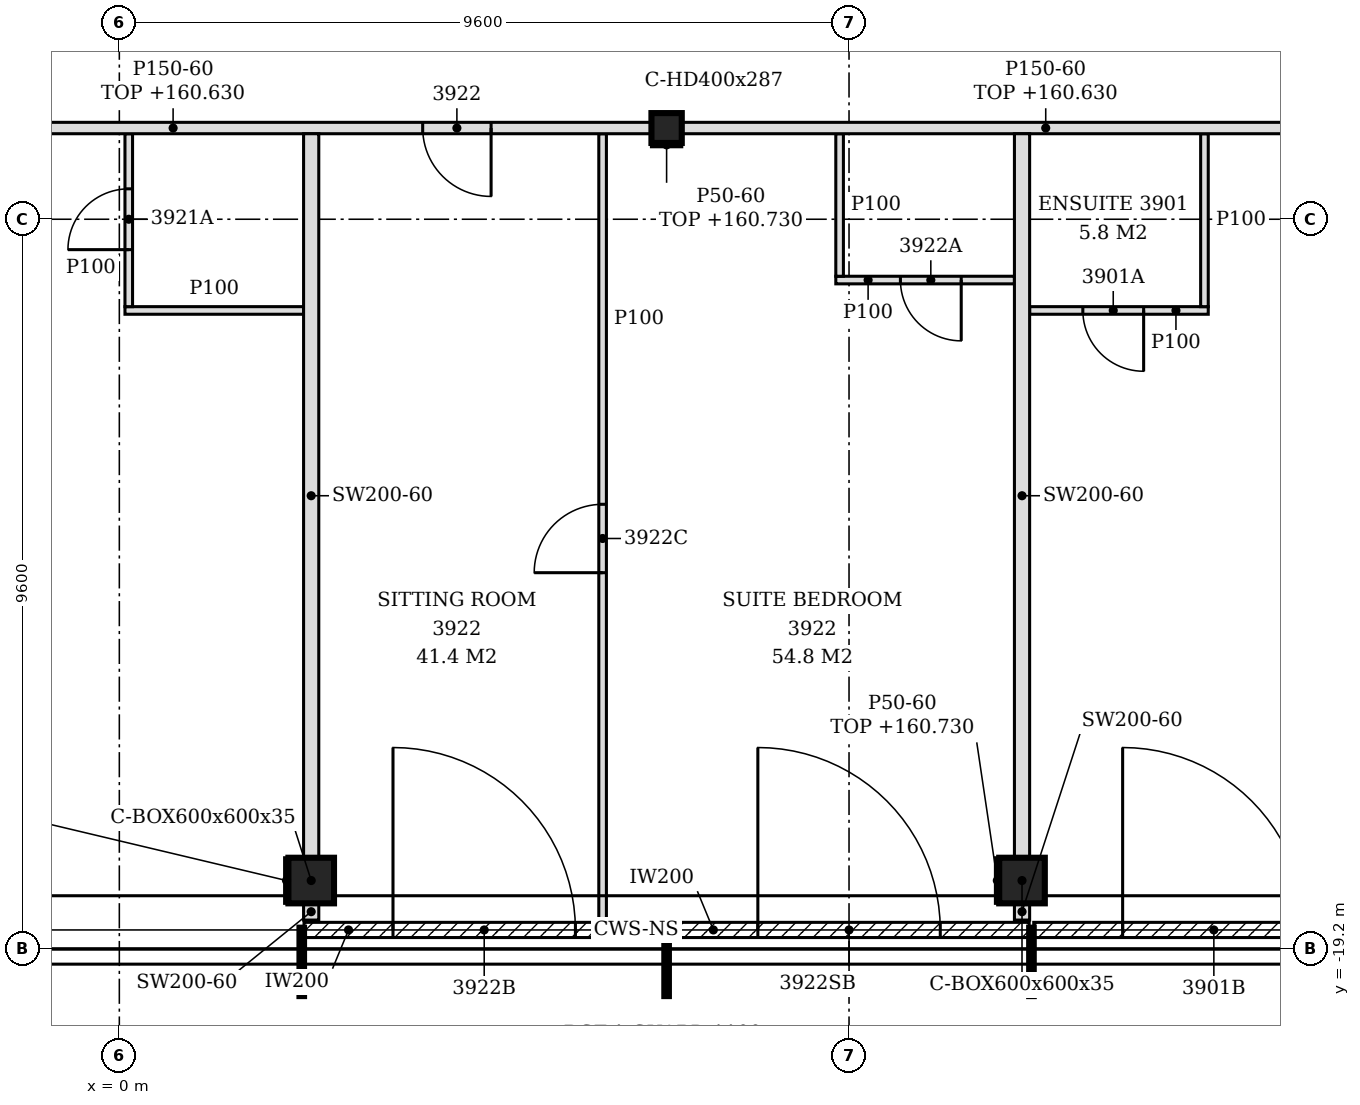
"""IFC4 building model, lengths in metres.
Left out: names, types, materials, properties, quantities, classifications, styles, units other than length and angle.
Written with IfcOpenShell. Run it as: python <this file> out.ifc"""

import sys

from ifc_helpers import new_model, si_unit, direction, frame, frame_2d, origin, origin_2d, place, context, subcontext, project, spatial, polyline, rectangle, hollow_rectangle, i_section, outline, extrude, element, fill, save


model = new_model("IFC4")
c1 = context("Model", 3, precision=1e-05, world=origin(), true_north=direction((0.0, 1.0)))
c2 = subcontext(c1, "Body", "Model", "MODEL_VIEW")
j1 = project(units=[si_unit("LENGTHUNIT", "METRE"), si_unit("PLANEANGLEUNIT", "RADIAN")], contexts=[c1])
p1 = place(None, origin())
s1 = spatial("IfcSite", under=j1, at=p1, CompositionType="ELEMENT")
p2 = place(p1, origin())
s2 = spatial("IfcBuilding", under=s1, at=p2, CompositionType="ELEMENT")
p3 = place(p2, frame((0.0, 0.0, 157.8)))
s3 = spatial("IfcBuildingStorey", under=s2, at=p3, CompositionType="ELEMENT", Elevation=157.8)
for number, where, z_axis, x_axis in (
    (1, (2.524, -18.3, -0.15), (0.0, 0.0, 1.0), (1.0, 0.0, 0.0)),
    (2, (11.876, -18.3, -0.15), (0.0, 0.0, 1.0), (1.0, 0.0, 0.0)),
):
    element("IfcColumn", number, at=place(p3, frame(where, z_axis=z_axis, x_axis=x_axis)), inside=s3, PredefinedType="COLUMN", context=c2, shape_type="SweptSolid", body=[
        extrude(hollow_rectangle(XDim=0.6, YDim=0.6, WallThickness=0.035, at=origin_2d()), origin(), (0.0, 0.0, 1.0), 3.6),
    ])
p4 = place(p3, frame((7.2, -8.4, -0.15), z_axis=(0.0, 0.0, 1.0), x_axis=(1.0, 0.0, 0.0)))
e3 = element("IfcColumn", 3, at=p4, inside=s3, PredefinedType="COLUMN", context=c2, shape_type="SweptSolid", body=[
    extrude(i_section(OverallWidth=0.399, OverallDepth=0.393, WebThickness=0.023, FlangeThickness=0.037, FilletRadius=0.015, at=origin_2d()), origin(), (0.0, 0.0, 1.0), 3.6),
])
p5 = place(p3, frame((2.43, -18.95, 0.0), z_axis=(0.0, 0.0, 1.0), x_axis=(1.0, 0.0, 0.0)))
e4 = element("IfcWall", 4, at=p5, inside=s3, PredefinedType="NOTDEFINED", context=c2, shape_type="SweptSolid", body=[
    extrude(rectangle(XDim=4.74, YDim=0.2, at=frame_2d((2.37, 0.0))), origin(), (0.0, 0.0, 1.0), 3.45),
])
p6 = place(p5, frame((1.17, 0.0, 0.0)))
e5 = element("IfcOpeningElement", 5, at=p6, cuts=e4, PredefinedType="OPENING", context=c2, shape_type="SweptSolid", body=[
    extrude(rectangle(XDim=2.4, YDim=2.4, at=frame_2d((1.2, 1.2))), frame((0.0, 0.11, 0.0), z_axis=(0.0, -1.0, 0.0), x_axis=(1.0, 0.0, 0.0)), (0.0, 0.0, 1.0), 0.22),
])
p7 = place(p3, frame((7.23, -18.95, 0.0), z_axis=(0.0, 0.0, 1.0), x_axis=(1.0, 0.0, 0.0)))
e6 = element("IfcWall", 6, at=p7, inside=s3, PredefinedType="NOTDEFINED", context=c2, shape_type="SweptSolid", body=[
    extrude(rectangle(XDim=4.74, YDim=0.2, at=frame_2d((2.37, 0.0))), origin(), (0.0, 0.0, 1.0), 3.45),
])
p8 = place(p7, frame((1.17, 0.0, 0.0)))
e7 = element("IfcOpeningElement", 7, at=p8, cuts=e6, PredefinedType="OPENING", context=c2, shape_type="SweptSolid", body=[
    extrude(rectangle(XDim=2.4, YDim=2.4, at=frame_2d((1.2, 1.2))), frame((0.0, 0.11, 0.0), z_axis=(0.0, -1.0, 0.0), x_axis=(1.0, 0.0, 0.0)), (0.0, 0.0, 1.0), 0.22),
])
p9 = place(p3, frame((12.03, -18.95, 0.0), z_axis=(0.0, 0.0, 1.0), x_axis=(1.0, 0.0, 0.0)))
e8 = element("IfcWall", 8, at=p9, inside=s3, PredefinedType="NOTDEFINED", context=c2, shape_type="SweptSolid", body=[
    extrude(rectangle(XDim=4.74, YDim=0.2, at=frame_2d((2.37, 0.0))), origin(), (0.0, 0.0, 1.0), 3.45),
])
p10 = place(p9, frame((1.17, 0.0, 0.0)))
e9 = element("IfcOpeningElement", 9, at=p10, cuts=e8, PredefinedType="OPENING", context=c2, shape_type="SweptSolid", body=[
    extrude(rectangle(XDim=2.4, YDim=2.4, at=frame_2d((1.2, 1.2))), frame((0.0, 0.11, 0.0), z_axis=(0.0, -1.0, 0.0), x_axis=(1.0, 0.0, 0.0)), (0.0, 0.0, 1.0), 0.22),
])
p11 = place(p3, frame((2.524, -18.82, 0.0), z_axis=(0.0, 0.0, 1.0), x_axis=(0.0, 1.0, 0.0)))
e10 = element("IfcWall", 10, at=p11, inside=s3, PredefinedType="PARTITIONING", context=c2, shape_type="SweptSolid", body=[
    extrude(rectangle(XDim=0.22, YDim=0.2, at=frame_2d((0.11, 0.0))), origin(), (0.0, 0.0, 1.0), 3.45),
])
p12 = place(p3, frame((6.358, -18.82, 0.0), z_axis=(0.0, 0.0, 1.0), x_axis=(0.0, 1.0, 0.0)))
e11 = element("IfcWall", 11, at=p12, inside=s3, PredefinedType="PARTITIONING", context=c2, shape_type="SweptSolid", body=[
    extrude(outline(polyline([(0.0, 0.0), (10.345, 0.0), (10.345, 2.83), (10.27, 2.83), (10.268, 3.45), (4.525, 3.45), (4.523, 2.88), (4.315, 2.88), (4.313, 3.45), (0.67, 3.45), (0.668, 2.93), (0.37, 2.93), (0.368, 3.45), (0.0, 3.45), (0.0, 0.0)])), frame((0.0, 0.05, 0.0), z_axis=(0.0, -1.0, 0.0), x_axis=(1.0, 0.0, 0.0)), (0.0, 0.0, 1.0), 0.1),
])
p13 = place(p12, frame((4.57, 0.0, 0.0)))
e12 = element("IfcOpeningElement", 12, at=p13, cuts=e11, PredefinedType="OPENING", context=c2, shape_type="SweptSolid", body=[
    extrude(rectangle(XDim=0.9, YDim=2.1, at=frame_2d((0.45, 1.05))), frame((0.0, 0.06, 0.0), z_axis=(0.0, -1.0, 0.0), x_axis=(1.0, 0.0, 0.0)), (0.0, 0.0, 1.0), 0.12),
])
p14 = place(p3, frame((11.876, -18.82, 0.0), z_axis=(0.0, 0.0, 1.0), x_axis=(0.0, 1.0, 0.0)))
e13 = element("IfcWall", 13, at=p14, inside=s3, PredefinedType="PARTITIONING", context=c2, shape_type="SweptSolid", body=[
    extrude(rectangle(XDim=0.22, YDim=0.2, at=frame_2d((0.11, 0.0))), origin(), (0.0, 0.0, 1.0), 3.45),
])
for number, where, z_axis, x_axis in (
    (14, (2.524, -18.0, 0.0), (0.0, 0.0, 1.0), (0.0, 1.0, 0.0)),
    (15, (11.876, -18.0, 0.0), (0.0, 0.0, 1.0), (0.0, 1.0, 0.0)),
):
    element("IfcWall", number, at=place(p3, frame(where, z_axis=z_axis, x_axis=x_axis)), inside=s3, PredefinedType="PARTITIONING", context=c2, shape_type="SweptSolid", body=[
        extrude(outline(polyline([(0.0, 0.0), (9.525, 0.0), (9.525, 2.83), (9.45, 2.83), (9.448, 3.45), (3.705, 3.45), (3.703, 2.88), (3.495, 2.88), (3.493, 3.45), (0.0, 3.45), (0.0, 0.0)])), frame((0.0, 0.1, 0.0), z_axis=(0.0, -1.0, 0.0), x_axis=(1.0, 0.0, 0.0)), (0.0, 0.0, 1.0), 0.2),
    ])
p15 = place(p3, frame((0.074, -10.8, 0.0), z_axis=(0.0, 0.0, 1.0), x_axis=(1.0, 0.0, 0.0)))
e16 = element("IfcWall", 16, at=p15, inside=s3, PredefinedType="PARTITIONING", context=c2, shape_type="SweptSolid", body=[
    extrude(rectangle(XDim=2.35, YDim=0.1, at=frame_2d((1.175, 0.0))), origin(), (0.0, 0.0, 1.0), 3.45),
])
p16 = place(p3, frame((0.124, -10.75, 0.0), z_axis=(0.0, 0.0, 1.0), x_axis=(0.0, 1.0, 0.0)))
e17 = element("IfcWall", 17, at=p16, inside=s3, PredefinedType="PARTITIONING", context=c2, shape_type="SweptSolid", body=[
    extrude(outline(polyline([(0.0, 0.0), (2.275, 0.0), (2.275, 2.83), (2.2, 2.83), (2.198, 3.45), (0.0, 3.45), (0.0, 0.0)])), frame((0.0, 0.05, 0.0), z_axis=(0.0, -1.0, 0.0), x_axis=(1.0, 0.0, 0.0)), (0.0, 0.0, 1.0), 0.1),
])
p17 = place(p16, frame((0.75, 0.0, 0.0)))
e18 = element("IfcOpeningElement", 18, at=p17, cuts=e17, PredefinedType="OPENING", context=c2, shape_type="SweptSolid", body=[
    extrude(rectangle(XDim=0.8, YDim=2.1, at=frame_2d((0.4, 1.05))), frame((0.0, 0.06, 0.0), z_axis=(0.0, -1.0, 0.0), x_axis=(1.0, 0.0, 0.0)), (0.0, 0.0, 1.0), 0.12),
])
p18 = place(p3, frame((11.976, -10.8, 0.0), z_axis=(0.0, 0.0, 1.0), x_axis=(1.0, 0.0, 0.0)))
e19 = element("IfcWall", 19, at=p18, inside=s3, PredefinedType="PARTITIONING", context=c2, shape_type="SweptSolid", body=[
    extrude(rectangle(XDim=2.35, YDim=0.1, at=frame_2d((1.175, 0.0))), origin(), (0.0, 0.0, 1.0), 3.45),
])
p19 = place(p18, frame((0.7, 0.0, 0.0)))
e20 = element("IfcOpeningElement", 20, at=p19, cuts=e19, PredefinedType="OPENING", context=c2, shape_type="SweptSolid", body=[
    extrude(rectangle(XDim=0.8, YDim=2.1, at=frame_2d((0.4, 1.05))), frame((0.0, 0.06, 0.0), z_axis=(0.0, -1.0, 0.0), x_axis=(1.0, 0.0, 0.0)), (0.0, 0.0, 1.0), 0.12),
])
p20 = place(p3, frame((14.276, -10.75, 0.0), z_axis=(0.0, 0.0, 1.0), x_axis=(0.0, 1.0, 0.0)))
e21 = element("IfcWall", 21, at=p20, inside=s3, PredefinedType="PARTITIONING", context=c2, shape_type="SweptSolid", body=[
    extrude(outline(polyline([(0.0, 0.0), (2.275, 0.0), (2.275, 2.83), (2.2, 2.83), (2.198, 3.45), (0.0, 3.45), (0.0, 0.0)])), frame((0.0, 0.05, 0.0), z_axis=(0.0, -1.0, 0.0), x_axis=(1.0, 0.0, 0.0)), (0.0, 0.0, 1.0), 0.1),
])
p21 = place(p3, frame((9.426, -10.4, 0.0), z_axis=(0.0, 0.0, 1.0), x_axis=(1.0, 0.0, 0.0)))
e22 = element("IfcWall", 22, at=p21, inside=s3, PredefinedType="PARTITIONING", context=c2, shape_type="SweptSolid", body=[
    extrude(rectangle(XDim=2.35, YDim=0.1, at=frame_2d((1.175, 0.0))), origin(), (0.0, 0.0, 1.0), 3.45),
])
p22 = place(p21, frame((0.85, 0.0, 0.0)))
e23 = element("IfcOpeningElement", 23, at=p22, cuts=e22, PredefinedType="OPENING", context=c2, shape_type="SweptSolid", body=[
    extrude(rectangle(XDim=0.8, YDim=2.1, at=frame_2d((0.4, 1.05))), frame((0.0, 0.06, 0.0), z_axis=(0.0, -1.0, 0.0), x_axis=(1.0, 0.0, 0.0)), (0.0, 0.0, 1.0), 0.12),
])
p23 = place(p3, frame((9.476, -10.35, 0.0), z_axis=(0.0, 0.0, 1.0), x_axis=(0.0, 1.0, 0.0)))
e24 = element("IfcWall", 24, at=p23, inside=s3, PredefinedType="PARTITIONING", context=c2, shape_type="SweptSolid", body=[
    extrude(outline(polyline([(0.0, 0.0), (1.875, 0.0), (1.875, 2.83), (1.8, 2.83), (1.798, 3.45), (0.0, 3.45), (0.0, 0.0)])), frame((0.0, 0.05, 0.0), z_axis=(0.0, -1.0, 0.0), x_axis=(1.0, 0.0, 0.0)), (0.0, 0.0, 1.0), 0.1),
])
p24 = place(p3, frame((-4.601, -8.4, 0.0), z_axis=(0.0, 0.0, 1.0), x_axis=(1.0, 0.0, 0.0)))
e25 = element("IfcWall", 25, at=p24, inside=s3, PredefinedType="PARTITIONING", context=c2, shape_type="SweptSolid", body=[
    extrude(rectangle(XDim=11.601, YDim=0.15, at=frame_2d((5.801, 0.0))), origin(), (0.0, 0.0, 1.0), 2.83),
])
p25 = place(p24, frame((1.125, 0.0, 0.0)))
e26 = element("IfcOpeningElement", 26, at=p25, cuts=e25, PredefinedType="OPENING", context=c2, shape_type="SweptSolid", body=[
    extrude(rectangle(XDim=0.9, YDim=2.1, at=frame_2d((0.45, 1.05))), frame((0.0, 0.085, 0.0), z_axis=(0.0, -1.0, 0.0), x_axis=(1.0, 0.0, 0.0)), (0.0, 0.0, 1.0), 0.17),
])
p26 = place(p24, frame((8.592, 0.0, 0.0)))
e27 = element("IfcOpeningElement", 27, at=p26, cuts=e25, PredefinedType="OPENING", context=c2, shape_type="SweptSolid", body=[
    extrude(rectangle(XDim=0.9, YDim=2.1, at=frame_2d((0.45, 1.05))), frame((0.0, 0.085, 0.0), z_axis=(0.0, -1.0, 0.0), x_axis=(1.0, 0.0, 0.0)), (0.0, 0.0, 1.0), 0.17),
])
p27 = place(p3, frame((7.399, -8.4, 0.0), z_axis=(0.0, 0.0, 1.0), x_axis=(1.0, 0.0, 0.0)))
e28 = element("IfcWall", 28, at=p27, inside=s3, PredefinedType="PARTITIONING", context=c2, shape_type="SweptSolid", body=[
    extrude(rectangle(XDim=11.601, YDim=0.15, at=frame_2d((5.801, 0.0))), origin(), (0.0, 0.0, 1.0), 2.83),
])
p28 = place(p27, frame((9.576, 0.0, 0.0)))
e29 = element("IfcOpeningElement", 29, at=p28, cuts=e28, PredefinedType="OPENING", context=c2, shape_type="SweptSolid", body=[
    extrude(rectangle(XDim=0.9, YDim=2.1, at=frame_2d((0.45, 1.05))), frame((0.0, 0.085, 0.0), z_axis=(0.0, -1.0, 0.0), x_axis=(1.0, 0.0, 0.0)), (0.0, 0.0, 1.0), 0.17),
])
for number, where, z_axis, x_axis in (
    (30, (2.199, -18.6, 0.0), (0.0, 0.0, 1.0), (0.0, 1.0, 0.0)),
    (31, (11.551, -18.6, 0.0), (0.0, 0.0, 1.0), (0.0, 1.0, 0.0)),
):
    element("IfcWall", number, at=place(p3, frame(where, z_axis=z_axis, x_axis=x_axis)), inside=s3, PredefinedType="PARTITIONING", context=c2, shape_type="SweptSolid", body=[
        extrude(rectangle(XDim=0.6, YDim=0.05, at=frame_2d((0.3, 0.0))), origin(), (0.0, 0.0, 1.0), 2.93),
    ])
p29 = place(p3, frame((7.0, -8.622, 0.0), z_axis=(0.0, 0.0, 1.0), x_axis=(1.0, 0.0, 0.0)))
e32 = element("IfcWall", 32, at=p29, inside=s3, PredefinedType="PARTITIONING", context=c2, shape_type="SweptSolid", body=[
    extrude(rectangle(XDim=0.399, YDim=0.05, at=frame_2d((0.199, 0.0))), origin(), (0.0, 0.0, 1.0), 2.93),
])
p30 = place(p6, origin())
e33 = element("IfcDoor", 33, at=p30, inside=s3, OperationType="SINGLE_SWING_LEFT", PredefinedType="DOOR", context=c2, shape_type="SweptSolid", body=[
    extrude(rectangle(XDim=2.4, YDim=2.4, at=frame_2d((1.2, 1.2))), frame((0.0, 0.025, 0.0), z_axis=(0.0, -1.0, 0.0), x_axis=(1.0, 0.0, 0.0)), (0.0, 0.0, 1.0), 0.05),
])
fill(e5, e33)
p31 = place(p8, origin())
e34 = element("IfcDoor", 34, at=p31, inside=s3, OperationType="SINGLE_SWING_LEFT", PredefinedType="DOOR", context=c2, shape_type="SweptSolid", body=[
    extrude(rectangle(XDim=2.4, YDim=2.4, at=frame_2d((1.2, 1.2))), frame((0.0, 0.025, 0.0), z_axis=(0.0, -1.0, 0.0), x_axis=(1.0, 0.0, 0.0)), (0.0, 0.0, 1.0), 0.05),
])
fill(e7, e34)
p32 = place(p10, origin())
e35 = element("IfcDoor", 35, at=p32, inside=s3, OperationType="SINGLE_SWING_LEFT", PredefinedType="DOOR", context=c2, shape_type="SweptSolid", body=[
    extrude(rectangle(XDim=2.4, YDim=2.4, at=frame_2d((1.2, 1.2))), frame((0.0, 0.025, 0.0), z_axis=(0.0, -1.0, 0.0), x_axis=(1.0, 0.0, 0.0)), (0.0, 0.0, 1.0), 0.05),
])
fill(e9, e35)
p33 = place(p19, frame((0.8, 0.0, 0.0), z_axis=(0.0, 0.0, 1.0), x_axis=(-1.0, 0.0, 0.0)))
e36 = element("IfcDoor", 36, at=p33, inside=s3, OperationType="SINGLE_SWING_LEFT", PredefinedType="DOOR", context=c2, shape_type="SweptSolid", body=[
    extrude(rectangle(XDim=0.8, YDim=2.1, at=frame_2d((0.4, 1.05))), frame((0.0, 0.025, 0.0), z_axis=(0.0, -1.0, 0.0), x_axis=(1.0, 0.0, 0.0)), (0.0, 0.0, 1.0), 0.05),
])
fill(e20, e36)
p34 = place(p17, origin())
e37 = element("IfcDoor", 37, at=p34, inside=s3, OperationType="SINGLE_SWING_LEFT", PredefinedType="DOOR", context=c2, shape_type="SweptSolid", body=[
    extrude(rectangle(XDim=0.8, YDim=2.1, at=frame_2d((0.4, 1.05))), frame((0.0, 0.025, 0.0), z_axis=(0.0, -1.0, 0.0), x_axis=(1.0, 0.0, 0.0)), (0.0, 0.0, 1.0), 0.05),
])
fill(e18, e37)
p35 = place(p26, frame((0.9, 0.0, 0.0), z_axis=(0.0, 0.0, 1.0), x_axis=(-1.0, 0.0, 0.0)))
e38 = element("IfcDoor", 38, at=p35, inside=s3, OperationType="SINGLE_SWING_LEFT", PredefinedType="DOOR", context=c2, shape_type="SweptSolid", body=[
    extrude(rectangle(XDim=0.9, YDim=2.1, at=frame_2d((0.45, 1.05))), frame((0.0, 0.025, 0.0), z_axis=(0.0, -1.0, 0.0), x_axis=(1.0, 0.0, 0.0)), (0.0, 0.0, 1.0), 0.05),
])
fill(e27, e38)
p36 = place(p13, origin())
e39 = element("IfcDoor", 39, at=p36, inside=s3, OperationType="SINGLE_SWING_LEFT", PredefinedType="DOOR", context=c2, shape_type="SweptSolid", body=[
    extrude(rectangle(XDim=0.9, YDim=2.1, at=frame_2d((0.45, 1.05))), frame((0.0, 0.025, 0.0), z_axis=(0.0, -1.0, 0.0), x_axis=(1.0, 0.0, 0.0)), (0.0, 0.0, 1.0), 0.05),
])
fill(e12, e39)
p37 = place(p22, frame((0.8, 0.0, 0.0), z_axis=(0.0, 0.0, 1.0), x_axis=(-1.0, 0.0, 0.0)))
e40 = element("IfcDoor", 40, at=p37, inside=s3, OperationType="SINGLE_SWING_LEFT", PredefinedType="DOOR", context=c2, shape_type="SweptSolid", body=[
    extrude(rectangle(XDim=0.8, YDim=2.1, at=frame_2d((0.4, 1.05))), frame((0.0, 0.025, 0.0), z_axis=(0.0, -1.0, 0.0), x_axis=(1.0, 0.0, 0.0)), (0.0, 0.0, 1.0), 0.05),
])
fill(e23, e40)
save(model, sys.argv[1])
